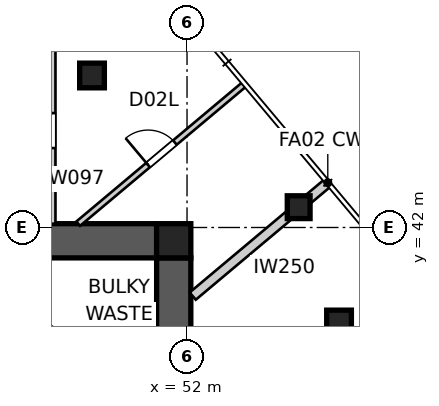
"""IFC4 building model, lengths in metres.
Left out: names, types, materials, properties, quantities, classifications, styles, units other than length and angle.
Written with IfcOpenShell. Run it as: python <this file> out.ifc"""

import sys

from ifc_helpers import new_model, si_unit, direction, frame, frame_2d, origin, origin_2d, place, context, subcontext, project, spatial, polyline, rectangle, outline, extrude, element, fill, save


model = new_model("IFC4")
c1 = context("Model", 3, precision=1e-05, world=origin(), true_north=direction((0.0, 1.0)))
c2 = subcontext(c1, "Body", "Model", "MODEL_VIEW")
j1 = project(units=[si_unit("LENGTHUNIT", "METRE"), si_unit("PLANEANGLEUNIT", "RADIAN")], contexts=[c1])
p1 = place(None, origin())
s1 = spatial("IfcSite", under=j1, at=p1, CompositionType="ELEMENT")
p2 = place(p1, origin())
s2 = spatial("IfcBuilding", under=s1, at=p2, CompositionType="ELEMENT")
p3 = place(p2, frame((0.0, 0.0, 279.4)))
s3 = spatial("IfcBuildingStorey", under=s2, at=p3, CompositionType="ELEMENT", Elevation=279.4)
p4 = place(p3, frame((28.8, 41.65, 0.0), z_axis=(0.0, 0.0, 1.0), x_axis=(1.0, 0.0, 0.0)))
e1 = element("IfcWall", 1, at=p4, inside=s3, PredefinedType="SHEAR", context=c2, shape_type="SweptSolid", body=[
    extrude(outline(polyline([(0.0, -0.45), (22.4, -0.45), (22.4, -0.025), (22.85, -0.025), (22.85, 0.025), (22.4, 0.025), (22.4, 0.45), (0.0, 0.45), (0.0, 0.025), (-0.45, 0.025), (-0.45, -0.025), (0.0, -0.025), (0.0, -0.45)])), origin(), (0.0, 0.0, 1.0), 3.4),
])
p5 = place(p3, frame((51.65, 18.8, 0.0), z_axis=(0.0, 0.0, 1.0), x_axis=(0.0, 1.0, 0.0)))
e2 = element("IfcWall", 2, at=p5, inside=s3, PredefinedType="SHEAR", context=c2, shape_type="SweptSolid", body=[
    extrude(outline(polyline([(0.0, -0.45), (22.4, -0.45), (22.4, -0.025), (22.85, -0.025), (22.85, 0.025), (22.4, 0.025), (22.4, 0.45), (0.0, 0.45), (0.0, 0.025), (-0.45, 0.025), (-0.45, -0.025), (0.0, -0.025), (0.0, -0.45)])), origin(), (0.0, 0.0, 1.0), 3.4),
])
p6 = place(p5, frame((11.14, 0.0, 0.0)))
e3 = element("IfcOpeningElement", 3, at=p6, cuts=e2, PredefinedType="OPENING", context=c2, shape_type="SweptSolid", body=[
    extrude(rectangle(XDim=1.02, YDim=2.4, at=frame_2d((0.51, 1.2))), frame((0.0, 0.46, 0.0), z_axis=(0.0, -1.0, 0.0), x_axis=(1.0, 0.0, 0.0)), (0.0, 0.0, 1.0), 0.92),
])
p7 = place(p3, frame((51.65, 41.65, 0.0), z_axis=(0.0, 0.0, 1.0), x_axis=(1.0, 0.0, 0.0)))
e4 = element("IfcColumn", 4, at=p7, inside=s3, PredefinedType="COLUMN", context=c2, shape_type="SweptSolid", body=[
    extrude(rectangle(XDim=0.9, YDim=0.9, at=origin_2d()), origin(), (0.0, 0.0, 1.0), 3.4),
])
p8 = place(p3, frame((54.938, 42.534, 0.0), z_axis=(0.0, 0.0, 1.0), x_axis=(1.0, 0.0, 0.0)))
e5 = element("IfcColumn", 5, at=p8, inside=s3, PredefinedType="COLUMN", context=c2, shape_type="SweptSolid", body=[
    extrude(rectangle(XDim=0.6, YDim=0.6, at=origin_2d()), origin(), (0.0, 0.0, 1.0), 3.4),
])
for number, where, z_axis, x_axis in (
    (6, (56.0, 39.5, 0.0), (0.0, 0.0, 1.0), (1.0, 0.0, 0.0)),
    (7, (49.5, 46.0, 0.0), (0.0, 0.0, 1.0), (1.0, 0.0, 0.0)),
):
    element("IfcColumn", number, at=place(p3, frame(where, z_axis=z_axis, x_axis=x_axis)), inside=s3, PredefinedType="COLUMN", context=c2, shape_type="SweptSolid", body=[
        extrude(rectangle(XDim=0.65, YDim=0.65, at=origin_2d()), origin(), (0.0, 0.0, 1.0), 3.4),
    ])
p9 = place(p3, frame((55.704, 43.177, 0.0), z_axis=(0.0, 0.0, 1.0), x_axis=(-0.76603440109, -0.64279957712, 0.0)))
e8 = element("IfcWall", 8, at=p9, inside=s3, PredefinedType="PARTITIONING", context=c2, shape_type="SweptSolid", body=[
    extrude(rectangle(XDim=4.64, YDim=0.25, at=frame_2d((2.32, 0.0))), origin(), (0.0, 0.0, 1.0), 3.25),
])
p10 = place(p3, frame((49.136, 42.1, 0.0), z_axis=(0.0, 0.0, 1.0), x_axis=(0.766055078255, 0.642774935012, 0.0)))
e9 = element("IfcWall", 9, at=p10, inside=s3, PredefinedType="SOLIDWALL", context=c2, shape_type="SweptSolid", body=[
    extrude(rectangle(XDim=5.684, YDim=0.15, at=frame_2d((2.842, 0.0))), origin(), (0.0, 0.0, 1.0), 3.25),
])
p11 = place(p10, frame((2.402, 0.0, 0.0)))
e10 = element("IfcOpeningElement", 10, at=p11, cuts=e9, PredefinedType="OPENING", context=c2, shape_type="SweptSolid", body=[
    extrude(rectangle(XDim=0.92, YDim=2.1, at=frame_2d((0.46, 1.05))), frame((0.0, 0.085, 0.0), z_axis=(0.0, -1.0, 0.0), x_axis=(1.0, 0.0, 0.0)), (0.0, 0.0, 1.0), 0.17),
])
p12 = place(p3, frame((48.463, 42.1, 0.0), z_axis=(0.0, 0.0, 1.0), x_axis=(0.0, 1.0, 0.0)))
e11 = element("IfcWall", 11, at=p12, inside=s3, PredefinedType="SOLIDWALL", context=c2, shape_type="SweptSolid", body=[
    extrude(rectangle(XDim=4.9, YDim=0.15, at=frame_2d((2.45, 0.0))), origin(), (0.0, 0.0, 1.0), 3.25),
])
p13 = place(p12, frame((1.99, 0.0, 0.0)))
e12 = element("IfcOpeningElement", 12, at=p13, cuts=e11, PredefinedType="OPENING", context=c2, shape_type="SweptSolid", body=[
    extrude(rectangle(XDim=0.92, YDim=2.34, at=frame_2d((0.46, 1.17))), frame((0.0, 0.085, 0.0), z_axis=(0.0, -1.0, 0.0), x_axis=(1.0, 0.0, 0.0)), (0.0, 0.0, 1.0), 0.17),
])
p14 = place(p13, origin())
e13 = element("IfcDoor", 13, at=p14, inside=s3, OperationType="SINGLE_SWING_RIGHT", PredefinedType="DOOR", context=c2, shape_type="SweptSolid", body=[
    extrude(rectangle(XDim=0.92, YDim=2.34, at=frame_2d((0.46, 1.17))), frame((0.0, 0.025, 0.0), z_axis=(0.0, -1.0, 0.0), x_axis=(1.0, 0.0, 0.0)), (0.0, 0.0, 1.0), 0.05),
])
fill(e12, e13)
p15 = place(p11, origin())
e14 = element("IfcDoor", 14, at=p15, inside=s3, OperationType="SINGLE_SWING_LEFT", PredefinedType="DOOR", context=c2, shape_type="SweptSolid", body=[
    extrude(rectangle(XDim=0.92, YDim=2.1, at=frame_2d((0.46, 1.05))), frame((0.0, 0.025, 0.0), z_axis=(0.0, -1.0, 0.0), x_axis=(1.0, 0.0, 0.0)), (0.0, 0.0, 1.0), 0.05),
])
fill(e10, e14)
save(model, sys.argv[1])
